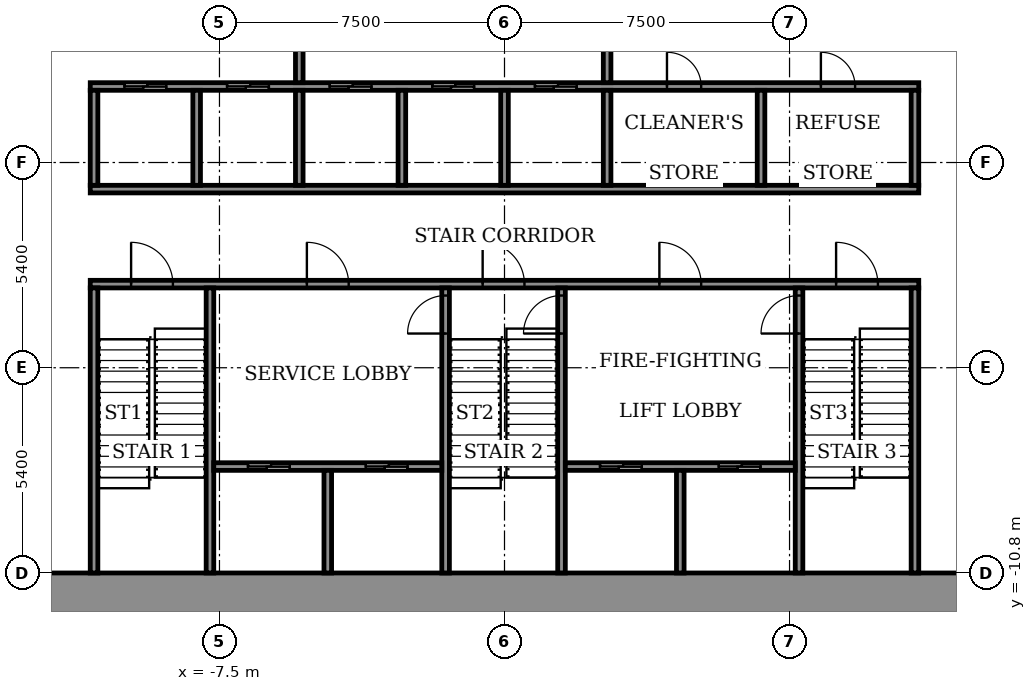
"""IFC4 building model, lengths in metres.
Left out: names, types, materials, properties, quantities, classifications, styles, units other than length and angle.
Written with IfcOpenShell. Run it as: python <this file> out.ifc"""

import sys

from ifc_helpers import new_model, si_unit, direction, frame, frame_2d, origin, place, context, subcontext, project, spatial, rectangle, extrude, element, fill, save


model = new_model("IFC4")
c1 = context("Model", 3, precision=1e-05, world=origin(), true_north=direction((0.0, 1.0)))
c2 = subcontext(c1, "Body", "Model", "MODEL_VIEW")
j1 = project(units=[si_unit("LENGTHUNIT", "METRE"), si_unit("PLANEANGLEUNIT", "RADIAN")], contexts=[c1])
p1 = place(None, origin())
s1 = spatial("IfcSite", under=j1, at=p1, CompositionType="ELEMENT")
p2 = place(p1, origin())
s2 = spatial("IfcBuilding", under=s1, at=p2, CompositionType="ELEMENT")
p3 = place(p2, frame((0.0, 0.0, 11.0)))
s3 = spatial("IfcBuildingStorey", under=s2, at=p3, CompositionType="ELEMENT", Elevation=11.0)
p4 = place(p3, frame((-15.0, -11.4, 0.0), z_axis=(0.0, 0.0, 1.0), x_axis=(1.0, 0.0, 0.0)))
e1 = element("IfcWall", 1, at=p4, inside=s3, PredefinedType="SHEAR", context=c2, shape_type="SweptSolid", body=[
    extrude(rectangle(XDim=30.0, YDim=1.2, at=frame_2d((15.0, 0.0))), origin(), (0.0, 0.0, 1.0), 5.0),
])
p5 = place(p3, frame((-10.9, -3.2, 0.0), z_axis=(0.0, 0.0, 1.0), x_axis=(1.0, 0.0, 0.0)))
e2 = element("IfcWall", 2, at=p5, inside=s3, PredefinedType="SHEAR", context=c2, shape_type="SweptSolid", body=[
    extrude(rectangle(XDim=21.8, YDim=0.2, at=frame_2d((10.9, 0.0))), origin(), (0.0, 0.0, 1.0), 4.45),
])
p6 = place(p5, frame((1.075, 0.0, 0.0)))
e3 = element("IfcOpeningElement", 3, at=p6, cuts=e2, PredefinedType="OPENING", context=c2, shape_type="SweptSolid", body=[
    extrude(rectangle(XDim=1.1, YDim=2.1, at=frame_2d((0.55, 1.05))), frame((0.0, 0.11, 0.0), z_axis=(0.0, -1.0, 0.0), x_axis=(1.0, 0.0, 0.0)), (0.0, 0.0, 1.0), 0.22),
])
p7 = place(p5, frame((10.325, 0.0, 0.0)))
e4 = element("IfcOpeningElement", 4, at=p7, cuts=e2, PredefinedType="OPENING", context=c2, shape_type="SweptSolid", body=[
    extrude(rectangle(XDim=1.1, YDim=2.1, at=frame_2d((0.55, 1.05))), frame((0.0, 0.11, 0.0), z_axis=(0.0, -1.0, 0.0), x_axis=(1.0, 0.0, 0.0)), (0.0, 0.0, 1.0), 0.22),
])
p8 = place(p5, frame((19.625, 0.0, 0.0)))
e5 = element("IfcOpeningElement", 5, at=p8, cuts=e2, PredefinedType="OPENING", context=c2, shape_type="SweptSolid", body=[
    extrude(rectangle(XDim=1.1, YDim=2.1, at=frame_2d((0.55, 1.05))), frame((0.0, 0.11, 0.0), z_axis=(0.0, -1.0, 0.0), x_axis=(1.0, 0.0, 0.0)), (0.0, 0.0, 1.0), 0.22),
])
p9 = place(p5, frame((5.7, 0.0, 0.0)))
e6 = element("IfcOpeningElement", 6, at=p9, cuts=e2, PredefinedType="OPENING", context=c2, shape_type="SweptSolid", body=[
    extrude(rectangle(XDim=1.1, YDim=2.1, at=frame_2d((0.55, 1.05))), frame((0.0, 0.11, 0.0), z_axis=(0.0, -1.0, 0.0), x_axis=(1.0, 0.0, 0.0)), (0.0, 0.0, 1.0), 0.22),
])
p10 = place(p5, frame((14.975, 0.0, 0.0)))
e7 = element("IfcOpeningElement", 7, at=p10, cuts=e2, PredefinedType="OPENING", context=c2, shape_type="SweptSolid", body=[
    extrude(rectangle(XDim=1.1, YDim=2.1, at=frame_2d((0.55, 1.05))), frame((0.0, 0.11, 0.0), z_axis=(0.0, -1.0, 0.0), x_axis=(1.0, 0.0, 0.0)), (0.0, 0.0, 1.0), 0.22),
])
p11 = place(p3, frame((-10.9, -0.7, 0.0), z_axis=(0.0, 0.0, 1.0), x_axis=(1.0, 0.0, 0.0)))
e8 = element("IfcWall", 8, at=p11, inside=s3, PredefinedType="SHEAR", context=c2, shape_type="SweptSolid", body=[
    extrude(rectangle(XDim=21.8, YDim=0.2, at=frame_2d((10.9, 0.0))), origin(), (0.0, 0.0, 1.0), 4.45),
])
p12 = place(p3, frame((-10.9, 2.0, 0.0), z_axis=(0.0, 0.0, 1.0), x_axis=(1.0, 0.0, 0.0)))
e9 = element("IfcWall", 9, at=p12, inside=s3, PredefinedType="SHEAR", context=c2, shape_type="SweptSolid", body=[
    extrude(rectangle(XDim=21.8, YDim=0.2, at=frame_2d((10.9, 0.0))), origin(), (0.0, 0.0, 1.0), 4.45),
])
p13 = place(p12, frame((0.9, 0.0, 0.0)))
e10 = element("IfcOpeningElement", 10, at=p13, cuts=e9, PredefinedType="OPENING", context=c2, shape_type="SweptSolid", body=[
    extrude(rectangle(XDim=1.1, YDim=2.1, at=frame_2d((0.55, 1.05))), frame((0.0, 0.11, 0.0), z_axis=(0.0, -1.0, 0.0), x_axis=(1.0, 0.0, 0.0)), (0.0, 0.0, 1.0), 0.22),
])
p14 = place(p12, frame((3.6, 0.0, 0.0)))
e11 = element("IfcOpeningElement", 11, at=p14, cuts=e9, PredefinedType="OPENING", context=c2, shape_type="SweptSolid", body=[
    extrude(rectangle(XDim=1.1, YDim=2.1, at=frame_2d((0.55, 1.05))), frame((0.0, 0.11, 0.0), z_axis=(0.0, -1.0, 0.0), x_axis=(1.0, 0.0, 0.0)), (0.0, 0.0, 1.0), 0.22),
])
p15 = place(p12, frame((6.3, 0.0, 0.0)))
e12 = element("IfcOpeningElement", 12, at=p15, cuts=e9, PredefinedType="OPENING", context=c2, shape_type="SweptSolid", body=[
    extrude(rectangle(XDim=1.1, YDim=2.1, at=frame_2d((0.55, 1.05))), frame((0.0, 0.11, 0.0), z_axis=(0.0, -1.0, 0.0), x_axis=(1.0, 0.0, 0.0)), (0.0, 0.0, 1.0), 0.22),
])
p16 = place(p12, frame((9.0, 0.0, 0.0)))
e13 = element("IfcOpeningElement", 13, at=p16, cuts=e9, PredefinedType="OPENING", context=c2, shape_type="SweptSolid", body=[
    extrude(rectangle(XDim=1.1, YDim=2.1, at=frame_2d((0.55, 1.05))), frame((0.0, 0.11, 0.0), z_axis=(0.0, -1.0, 0.0), x_axis=(1.0, 0.0, 0.0)), (0.0, 0.0, 1.0), 0.22),
])
p17 = place(p12, frame((11.7, 0.0, 0.0)))
e14 = element("IfcOpeningElement", 14, at=p17, cuts=e9, PredefinedType="OPENING", context=c2, shape_type="SweptSolid", body=[
    extrude(rectangle(XDim=1.1, YDim=2.1, at=frame_2d((0.55, 1.05))), frame((0.0, 0.11, 0.0), z_axis=(0.0, -1.0, 0.0), x_axis=(1.0, 0.0, 0.0)), (0.0, 0.0, 1.0), 0.22),
])
p18 = place(p12, frame((15.175, 0.0, 0.0)))
e15 = element("IfcOpeningElement", 15, at=p18, cuts=e9, PredefinedType="OPENING", context=c2, shape_type="SweptSolid", body=[
    extrude(rectangle(XDim=0.9, YDim=2.1, at=frame_2d((0.45, 1.05))), frame((0.0, 0.11, 0.0), z_axis=(0.0, -1.0, 0.0), x_axis=(1.0, 0.0, 0.0)), (0.0, 0.0, 1.0), 0.22),
])
p19 = place(p12, frame((19.225, 0.0, 0.0)))
e16 = element("IfcOpeningElement", 16, at=p19, cuts=e9, PredefinedType="OPENING", context=c2, shape_type="SweptSolid", body=[
    extrude(rectangle(XDim=0.9, YDim=2.1, at=frame_2d((0.45, 1.05))), frame((0.0, 0.11, 0.0), z_axis=(0.0, -1.0, 0.0), x_axis=(1.0, 0.0, 0.0)), (0.0, 0.0, 1.0), 0.22),
])
for number, where, z_axis, x_axis in (
    (17, (-10.8, -10.8, 0.0), (0.0, 0.0, 1.0), (0.0, 1.0, 0.0)),
    (18, (-7.75, -10.8, 0.0), (0.0, 0.0, 1.0), (0.0, 1.0, 0.0)),
):
    element("IfcWall", number, at=place(p3, frame(where, z_axis=z_axis, x_axis=x_axis)), inside=s3, PredefinedType="SHEAR", context=c2, shape_type="SweptSolid", body=[
        extrude(rectangle(XDim=7.5, YDim=0.2, at=frame_2d((3.75, 0.0))), origin(), (0.0, 0.0, 1.0), 4.45),
    ])
p20 = place(p3, frame((-1.55, -10.8, 0.0), z_axis=(0.0, 0.0, 1.0), x_axis=(0.0, 1.0, 0.0)))
e19 = element("IfcWall", 19, at=p20, inside=s3, PredefinedType="SHEAR", context=c2, shape_type="SweptSolid", body=[
    extrude(rectangle(XDim=7.5, YDim=0.2, at=frame_2d((3.75, 0.0))), origin(), (0.0, 0.0, 1.0), 4.45),
])
p21 = place(p20, frame((6.3, 0.0, 0.0)))
e20 = element("IfcOpeningElement", 20, at=p21, cuts=e19, PredefinedType="OPENING", context=c2, shape_type="SweptSolid", body=[
    extrude(rectangle(XDim=1.0, YDim=2.1, at=frame_2d((0.5, 1.05))), frame((0.0, 0.11, 0.0), z_axis=(0.0, -1.0, 0.0), x_axis=(1.0, 0.0, 0.0)), (0.0, 0.0, 1.0), 0.22),
])
p22 = place(p3, frame((1.5, -10.8, 0.0), z_axis=(0.0, 0.0, 1.0), x_axis=(0.0, 1.0, 0.0)))
e21 = element("IfcWall", 21, at=p22, inside=s3, PredefinedType="SHEAR", context=c2, shape_type="SweptSolid", body=[
    extrude(rectangle(XDim=7.5, YDim=0.2, at=frame_2d((3.75, 0.0))), origin(), (0.0, 0.0, 1.0), 4.45),
])
p23 = place(p22, frame((6.3, 0.0, 0.0)))
e22 = element("IfcOpeningElement", 22, at=p23, cuts=e21, PredefinedType="OPENING", context=c2, shape_type="SweptSolid", body=[
    extrude(rectangle(XDim=1.0, YDim=2.1, at=frame_2d((0.5, 1.05))), frame((0.0, 0.11, 0.0), z_axis=(0.0, -1.0, 0.0), x_axis=(1.0, 0.0, 0.0)), (0.0, 0.0, 1.0), 0.22),
])
p24 = place(p3, frame((7.75, -10.8, 0.0), z_axis=(0.0, 0.0, 1.0), x_axis=(0.0, 1.0, 0.0)))
e23 = element("IfcWall", 23, at=p24, inside=s3, PredefinedType="SHEAR", context=c2, shape_type="SweptSolid", body=[
    extrude(rectangle(XDim=7.5, YDim=0.2, at=frame_2d((3.75, 0.0))), origin(), (0.0, 0.0, 1.0), 4.45),
])
p25 = place(p24, frame((6.3, 0.0, 0.0)))
e24 = element("IfcOpeningElement", 24, at=p25, cuts=e23, PredefinedType="OPENING", context=c2, shape_type="SweptSolid", body=[
    extrude(rectangle(XDim=1.0, YDim=2.1, at=frame_2d((0.5, 1.05))), frame((0.0, 0.11, 0.0), z_axis=(0.0, -1.0, 0.0), x_axis=(1.0, 0.0, 0.0)), (0.0, 0.0, 1.0), 0.22),
])
p26 = place(p3, frame((10.8, -10.8, 0.0), z_axis=(0.0, 0.0, 1.0), x_axis=(0.0, 1.0, 0.0)))
e25 = element("IfcWall", 25, at=p26, inside=s3, PredefinedType="SHEAR", context=c2, shape_type="SweptSolid", body=[
    extrude(rectangle(XDim=7.5, YDim=0.2, at=frame_2d((3.75, 0.0))), origin(), (0.0, 0.0, 1.0), 4.45),
])
p27 = place(p3, frame((-7.65, -8.0, 0.0), z_axis=(0.0, 0.0, 1.0), x_axis=(1.0, 0.0, 0.0)))
e26 = element("IfcWall", 26, at=p27, inside=s3, PredefinedType="SHEAR", context=c2, shape_type="SweptSolid", body=[
    extrude(rectangle(XDim=6.0, YDim=0.2, at=frame_2d((3.0, 0.0))), origin(), (0.0, 0.0, 1.0), 4.45),
])
p28 = place(p27, frame((0.9, 0.0, 0.0)))
e27 = element("IfcOpeningElement", 27, at=p28, cuts=e26, PredefinedType="OPENING", context=c2, shape_type="SweptSolid", body=[
    extrude(rectangle(XDim=1.1, YDim=2.1, at=frame_2d((0.55, 1.05))), frame((0.0, 0.11, 0.0), z_axis=(0.0, -1.0, 0.0), x_axis=(1.0, 0.0, 0.0)), (0.0, 0.0, 1.0), 0.22),
])
p29 = place(p27, frame((4.0, 0.0, 0.0)))
e28 = element("IfcOpeningElement", 28, at=p29, cuts=e26, PredefinedType="OPENING", context=c2, shape_type="SweptSolid", body=[
    extrude(rectangle(XDim=1.1, YDim=2.1, at=frame_2d((0.55, 1.05))), frame((0.0, 0.11, 0.0), z_axis=(0.0, -1.0, 0.0), x_axis=(1.0, 0.0, 0.0)), (0.0, 0.0, 1.0), 0.22),
])
p30 = place(p3, frame((-4.65, -10.8, 0.0), z_axis=(0.0, 0.0, 1.0), x_axis=(0.0, 1.0, 0.0)))
e29 = element("IfcWall", 29, at=p30, inside=s3, PredefinedType="SHEAR", context=c2, shape_type="SweptSolid", body=[
    extrude(rectangle(XDim=2.7, YDim=0.2, at=frame_2d((1.35, 0.0))), origin(), (0.0, 0.0, 1.0), 4.45),
])
p31 = place(p3, frame((1.6, -8.0, 0.0), z_axis=(0.0, 0.0, 1.0), x_axis=(1.0, 0.0, 0.0)))
e30 = element("IfcWall", 30, at=p31, inside=s3, PredefinedType="SHEAR", context=c2, shape_type="SweptSolid", body=[
    extrude(rectangle(XDim=6.05, YDim=0.2, at=frame_2d((3.025, 0.0))), origin(), (0.0, 0.0, 1.0), 4.45),
])
p32 = place(p31, frame((0.913, 0.0, 0.0)))
e31 = element("IfcOpeningElement", 31, at=p32, cuts=e30, PredefinedType="OPENING", context=c2, shape_type="SweptSolid", body=[
    extrude(rectangle(XDim=1.1, YDim=2.1, at=frame_2d((0.55, 1.05))), frame((0.0, 0.11, 0.0), z_axis=(0.0, -1.0, 0.0), x_axis=(1.0, 0.0, 0.0)), (0.0, 0.0, 1.0), 0.22),
])
p33 = place(p31, frame((4.038, 0.0, 0.0)))
e32 = element("IfcOpeningElement", 32, at=p33, cuts=e30, PredefinedType="OPENING", context=c2, shape_type="SweptSolid", body=[
    extrude(rectangle(XDim=1.1, YDim=2.1, at=frame_2d((0.55, 1.05))), frame((0.0, 0.11, 0.0), z_axis=(0.0, -1.0, 0.0), x_axis=(1.0, 0.0, 0.0)), (0.0, 0.0, 1.0), 0.22),
])
p34 = place(p3, frame((4.625, -10.8, 0.0), z_axis=(0.0, 0.0, 1.0), x_axis=(0.0, 1.0, 0.0)))
e33 = element("IfcWall", 33, at=p34, inside=s3, PredefinedType="SHEAR", context=c2, shape_type="SweptSolid", body=[
    extrude(rectangle(XDim=2.7, YDim=0.2, at=frame_2d((1.35, 0.0))), origin(), (0.0, 0.0, 1.0), 4.45),
])
for number, where, z_axis, x_axis in (
    (34, (-10.8, -0.6, 0.0), (0.0, 0.0, 1.0), (0.0, 1.0, 0.0)),
    (35, (-8.1, -0.6, 0.0), (0.0, 0.0, 1.0), (0.0, 1.0, 0.0)),
    (36, (-5.4, -0.6, 0.0), (0.0, 0.0, 1.0), (0.0, 1.0, 0.0)),
    (37, (-2.7, -0.6, 0.0), (0.0, 0.0, 1.0), (0.0, 1.0, 0.0)),
    (38, (0.0, -0.6, 0.0), (0.0, 0.0, 1.0), (0.0, 1.0, 0.0)),
    (39, (2.7, -0.6, 0.0), (0.0, 0.0, 1.0), (0.0, 1.0, 0.0)),
):
    element("IfcWall", number, at=place(p3, frame(where, z_axis=z_axis, x_axis=x_axis)), inside=s3, PredefinedType="SHEAR", context=c2, shape_type="SweptSolid", body=[
        extrude(rectangle(XDim=2.5, YDim=0.2, at=frame_2d((1.25, 0.0))), origin(), (0.0, 0.0, 1.0), 4.45),
    ])
for number, where, z_axis, x_axis in (
    (40, (6.75, -0.6, 0.0), (0.0, 0.0, 1.0), (0.0, 1.0, 0.0)),
    (41, (10.8, -0.6, 0.0), (0.0, 0.0, 1.0), (0.0, 1.0, 0.0)),
):
    element("IfcWall", number, at=place(p3, frame(where, z_axis=z_axis, x_axis=x_axis)), inside=s3, PredefinedType="STANDARD", context=c2, shape_type="SweptSolid", body=[
        extrude(rectangle(XDim=2.5, YDim=0.2, at=frame_2d((1.25, 0.0))), origin(), (0.0, 0.0, 1.0), 4.45),
    ])
p35 = place(p3, frame((-5.4, 2.1, 0.0), z_axis=(0.0, 0.0, 1.0), x_axis=(0.0, 1.0, 0.0)))
e42 = element("IfcWall", 42, at=p35, inside=s3, PredefinedType="STANDARD", context=c2, shape_type="SweptSolid", body=[
    extrude(rectangle(XDim=5.9, YDim=0.2, at=frame_2d((2.95, 0.0))), origin(), (0.0, 0.0, 1.0), 4.45),
])
p36 = place(p35, frame((2.35, 0.0, 0.0)))
e43 = element("IfcOpeningElement", 43, at=p36, cuts=e42, PredefinedType="OPENING", context=c2, shape_type="SweptSolid", body=[
    extrude(rectangle(XDim=1.2, YDim=2.1, at=frame_2d((0.6, 1.05))), frame((0.0, 0.11, 0.0), z_axis=(0.0, -1.0, 0.0), x_axis=(1.0, 0.0, 0.0)), (0.0, 0.0, 1.0), 0.22),
])
p37 = place(p3, frame((2.7, 2.1, 0.0), z_axis=(0.0, 0.0, 1.0), x_axis=(0.0, 1.0, 0.0)))
e44 = element("IfcWall", 44, at=p37, inside=s3, PredefinedType="STANDARD", context=c2, shape_type="SweptSolid", body=[
    extrude(rectangle(XDim=5.9, YDim=0.2, at=frame_2d((2.95, 0.0))), origin(), (0.0, 0.0, 1.0), 4.45),
])
p38 = place(p37, frame((2.35, 0.0, 0.0)))
e45 = element("IfcOpeningElement", 45, at=p38, cuts=e44, PredefinedType="OPENING", context=c2, shape_type="SweptSolid", body=[
    extrude(rectangle(XDim=1.2, YDim=2.1, at=frame_2d((0.6, 1.05))), frame((0.0, 0.11, 0.0), z_axis=(0.0, -1.0, 0.0), x_axis=(1.0, 0.0, 0.0)), (0.0, 0.0, 1.0), 0.22),
])
p39 = place(p13, origin())
e46 = element("IfcDoor", 46, at=p39, inside=s3, OperationType="SLIDING_TO_LEFT", PredefinedType="DOOR", context=c2, shape_type="SweptSolid", body=[
    extrude(rectangle(XDim=1.1, YDim=2.1, at=frame_2d((0.55, 1.05))), frame((0.0, 0.025, 0.0), z_axis=(0.0, -1.0, 0.0), x_axis=(1.0, 0.0, 0.0)), (0.0, 0.0, 1.0), 0.05),
])
fill(e10, e46)
p40 = place(p14, origin())
e47 = element("IfcDoor", 47, at=p40, inside=s3, OperationType="SLIDING_TO_LEFT", PredefinedType="DOOR", context=c2, shape_type="SweptSolid", body=[
    extrude(rectangle(XDim=1.1, YDim=2.1, at=frame_2d((0.55, 1.05))), frame((0.0, 0.025, 0.0), z_axis=(0.0, -1.0, 0.0), x_axis=(1.0, 0.0, 0.0)), (0.0, 0.0, 1.0), 0.05),
])
fill(e11, e47)
p41 = place(p15, origin())
e48 = element("IfcDoor", 48, at=p41, inside=s3, OperationType="SLIDING_TO_LEFT", PredefinedType="DOOR", context=c2, shape_type="SweptSolid", body=[
    extrude(rectangle(XDim=1.1, YDim=2.1, at=frame_2d((0.55, 1.05))), frame((0.0, 0.025, 0.0), z_axis=(0.0, -1.0, 0.0), x_axis=(1.0, 0.0, 0.0)), (0.0, 0.0, 1.0), 0.05),
])
fill(e12, e48)
p42 = place(p16, origin())
e49 = element("IfcDoor", 49, at=p42, inside=s3, OperationType="SLIDING_TO_LEFT", PredefinedType="DOOR", context=c2, shape_type="SweptSolid", body=[
    extrude(rectangle(XDim=1.1, YDim=2.1, at=frame_2d((0.55, 1.05))), frame((0.0, 0.025, 0.0), z_axis=(0.0, -1.0, 0.0), x_axis=(1.0, 0.0, 0.0)), (0.0, 0.0, 1.0), 0.05),
])
fill(e13, e49)
p43 = place(p17, origin())
e50 = element("IfcDoor", 50, at=p43, inside=s3, OperationType="SLIDING_TO_LEFT", PredefinedType="DOOR", context=c2, shape_type="SweptSolid", body=[
    extrude(rectangle(XDim=1.1, YDim=2.1, at=frame_2d((0.55, 1.05))), frame((0.0, 0.025, 0.0), z_axis=(0.0, -1.0, 0.0), x_axis=(1.0, 0.0, 0.0)), (0.0, 0.0, 1.0), 0.05),
])
fill(e14, e50)
p44 = place(p18, origin())
e51 = element("IfcDoor", 51, at=p44, inside=s3, OperationType="SINGLE_SWING_RIGHT", PredefinedType="DOOR", context=c2, shape_type="SweptSolid", body=[
    extrude(rectangle(XDim=0.9, YDim=2.1, at=frame_2d((0.45, 1.05))), frame((0.0, 0.025, 0.0), z_axis=(0.0, -1.0, 0.0), x_axis=(1.0, 0.0, 0.0)), (0.0, 0.0, 1.0), 0.05),
])
fill(e15, e51)
p45 = place(p19, origin())
e52 = element("IfcDoor", 52, at=p45, inside=s3, OperationType="SINGLE_SWING_RIGHT", PredefinedType="DOOR", context=c2, shape_type="SweptSolid", body=[
    extrude(rectangle(XDim=0.9, YDim=2.1, at=frame_2d((0.45, 1.05))), frame((0.0, 0.025, 0.0), z_axis=(0.0, -1.0, 0.0), x_axis=(1.0, 0.0, 0.0)), (0.0, 0.0, 1.0), 0.05),
])
fill(e16, e52)
p46 = place(p32, origin())
e53 = element("IfcDoor", 53, at=p46, inside=s3, OperationType="SLIDING_TO_LEFT", PredefinedType="DOOR", context=c2, shape_type="SweptSolid", body=[
    extrude(rectangle(XDim=1.1, YDim=2.1, at=frame_2d((0.55, 1.05))), frame((0.0, 0.025, 0.0), z_axis=(0.0, -1.0, 0.0), x_axis=(1.0, 0.0, 0.0)), (0.0, 0.0, 1.0), 0.05),
])
fill(e31, e53)
p47 = place(p28, origin())
e54 = element("IfcDoor", 54, at=p47, inside=s3, OperationType="SLIDING_TO_LEFT", PredefinedType="DOOR", context=c2, shape_type="SweptSolid", body=[
    extrude(rectangle(XDim=1.1, YDim=2.1, at=frame_2d((0.55, 1.05))), frame((0.0, 0.025, 0.0), z_axis=(0.0, -1.0, 0.0), x_axis=(1.0, 0.0, 0.0)), (0.0, 0.0, 1.0), 0.05),
])
fill(e27, e54)
p48 = place(p33, origin())
e55 = element("IfcDoor", 55, at=p48, inside=s3, OperationType="SLIDING_TO_LEFT", PredefinedType="DOOR", context=c2, shape_type="SweptSolid", body=[
    extrude(rectangle(XDim=1.1, YDim=2.1, at=frame_2d((0.55, 1.05))), frame((0.0, 0.025, 0.0), z_axis=(0.0, -1.0, 0.0), x_axis=(1.0, 0.0, 0.0)), (0.0, 0.0, 1.0), 0.05),
])
fill(e32, e55)
p49 = place(p29, origin())
e56 = element("IfcDoor", 56, at=p49, inside=s3, OperationType="SLIDING_TO_LEFT", PredefinedType="DOOR", context=c2, shape_type="SweptSolid", body=[
    extrude(rectangle(XDim=1.1, YDim=2.1, at=frame_2d((0.55, 1.05))), frame((0.0, 0.025, 0.0), z_axis=(0.0, -1.0, 0.0), x_axis=(1.0, 0.0, 0.0)), (0.0, 0.0, 1.0), 0.05),
])
fill(e28, e56)
p50 = place(p6, origin())
e57 = element("IfcDoor", 57, at=p50, inside=s3, OperationType="SINGLE_SWING_RIGHT", PredefinedType="DOOR", context=c2, shape_type="SweptSolid", body=[
    extrude(rectangle(XDim=1.1, YDim=2.1, at=frame_2d((0.55, 1.05))), frame((0.0, 0.025, 0.0), z_axis=(0.0, -1.0, 0.0), x_axis=(1.0, 0.0, 0.0)), (0.0, 0.0, 1.0), 0.05),
])
fill(e3, e57)
p51 = place(p7, origin())
e58 = element("IfcDoor", 58, at=p51, inside=s3, OperationType="SINGLE_SWING_RIGHT", PredefinedType="DOOR", context=c2, shape_type="SweptSolid", body=[
    extrude(rectangle(XDim=1.1, YDim=2.1, at=frame_2d((0.55, 1.05))), frame((0.0, 0.025, 0.0), z_axis=(0.0, -1.0, 0.0), x_axis=(1.0, 0.0, 0.0)), (0.0, 0.0, 1.0), 0.05),
])
fill(e4, e58)
p52 = place(p8, origin())
e59 = element("IfcDoor", 59, at=p52, inside=s3, OperationType="SINGLE_SWING_RIGHT", PredefinedType="DOOR", context=c2, shape_type="SweptSolid", body=[
    extrude(rectangle(XDim=1.1, YDim=2.1, at=frame_2d((0.55, 1.05))), frame((0.0, 0.025, 0.0), z_axis=(0.0, -1.0, 0.0), x_axis=(1.0, 0.0, 0.0)), (0.0, 0.0, 1.0), 0.05),
])
fill(e5, e59)
p53 = place(p9, origin())
e60 = element("IfcDoor", 60, at=p53, inside=s3, OperationType="SINGLE_SWING_LEFT", PredefinedType="DOOR", context=c2, shape_type="SweptSolid", body=[
    extrude(rectangle(XDim=1.1, YDim=2.1, at=frame_2d((0.55, 1.05))), frame((0.0, 0.025, 0.0), z_axis=(0.0, -1.0, 0.0), x_axis=(1.0, 0.0, 0.0)), (0.0, 0.0, 1.0), 0.05),
])
fill(e6, e60)
p54 = place(p10, origin())
e61 = element("IfcDoor", 61, at=p54, inside=s3, OperationType="SINGLE_SWING_LEFT", PredefinedType="DOOR", context=c2, shape_type="SweptSolid", body=[
    extrude(rectangle(XDim=1.1, YDim=2.1, at=frame_2d((0.55, 1.05))), frame((0.0, 0.025, 0.0), z_axis=(0.0, -1.0, 0.0), x_axis=(1.0, 0.0, 0.0)), (0.0, 0.0, 1.0), 0.05),
])
fill(e7, e61)
p55 = place(p21, origin())
e62 = element("IfcDoor", 62, at=p55, inside=s3, OperationType="SINGLE_SWING_RIGHT", PredefinedType="DOOR", context=c2, shape_type="SweptSolid", body=[
    extrude(rectangle(XDim=1.0, YDim=2.1, at=frame_2d((0.5, 1.05))), frame((0.0, 0.025, 0.0), z_axis=(0.0, -1.0, 0.0), x_axis=(1.0, 0.0, 0.0)), (0.0, 0.0, 1.0), 0.05),
])
fill(e20, e62)
p56 = place(p23, origin())
e63 = element("IfcDoor", 63, at=p56, inside=s3, OperationType="SINGLE_SWING_RIGHT", PredefinedType="DOOR", context=c2, shape_type="SweptSolid", body=[
    extrude(rectangle(XDim=1.0, YDim=2.1, at=frame_2d((0.5, 1.05))), frame((0.0, 0.025, 0.0), z_axis=(0.0, -1.0, 0.0), x_axis=(1.0, 0.0, 0.0)), (0.0, 0.0, 1.0), 0.05),
])
fill(e22, e63)
p57 = place(p25, origin())
e64 = element("IfcDoor", 64, at=p57, inside=s3, OperationType="SINGLE_SWING_RIGHT", PredefinedType="DOOR", context=c2, shape_type="SweptSolid", body=[
    extrude(rectangle(XDim=1.0, YDim=2.1, at=frame_2d((0.5, 1.05))), frame((0.0, 0.025, 0.0), z_axis=(0.0, -1.0, 0.0), x_axis=(1.0, 0.0, 0.0)), (0.0, 0.0, 1.0), 0.05),
])
fill(e24, e64)
save(model, sys.argv[1])
